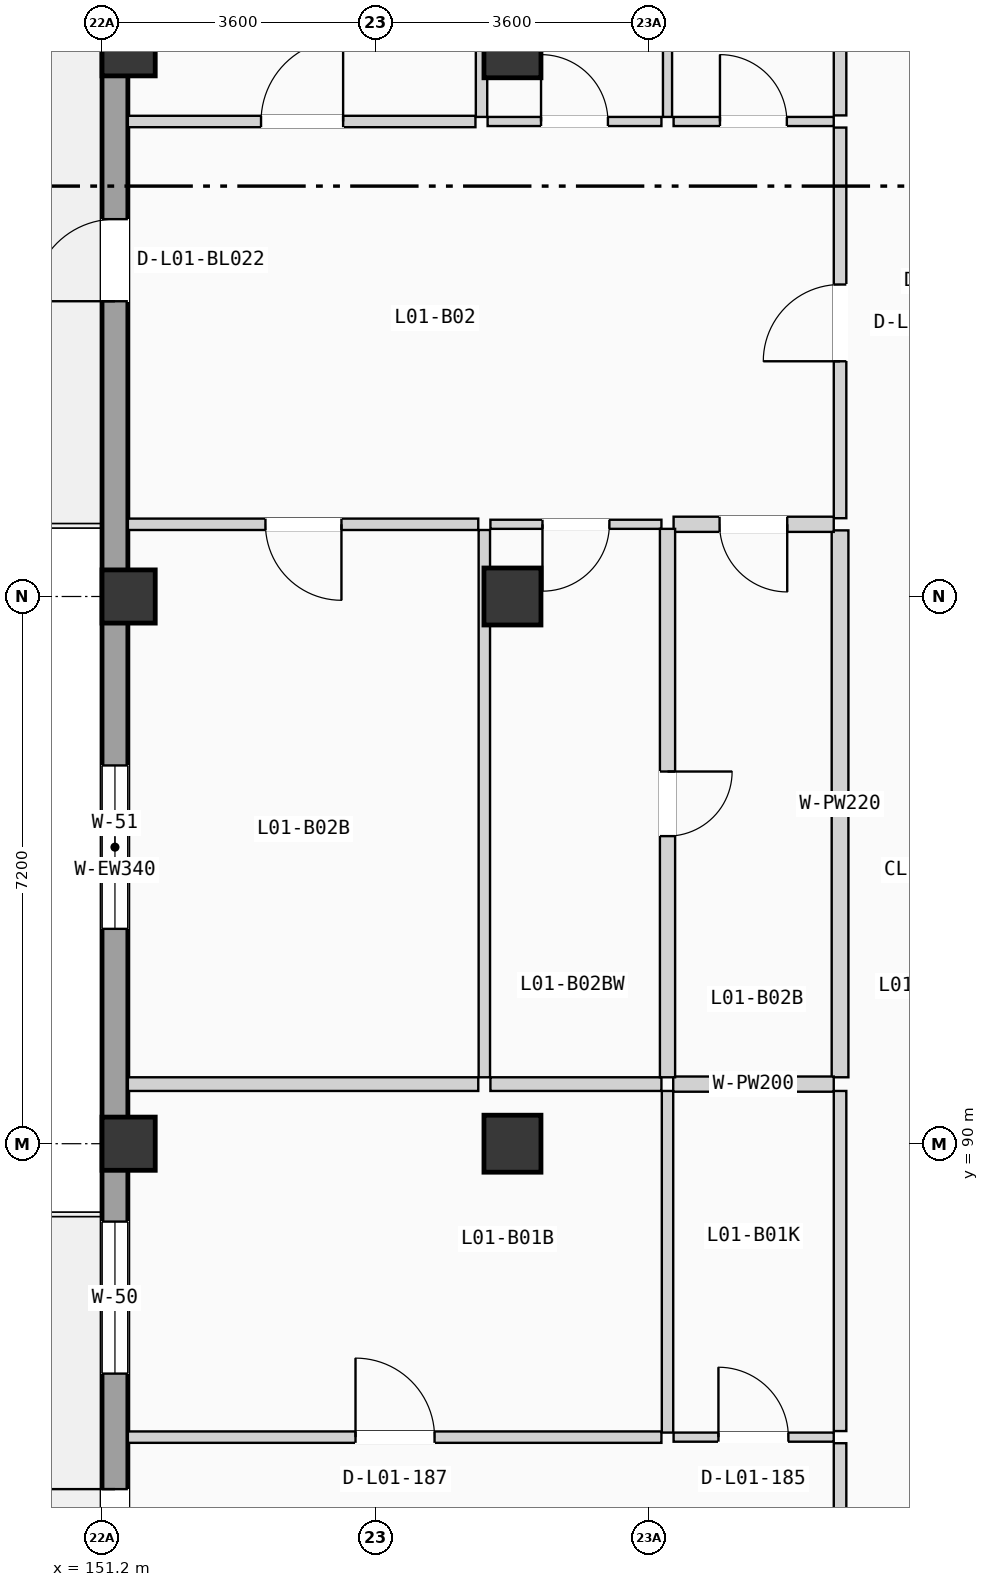
"""IFC4 building model, lengths in metres.
Left out: names, types, materials, properties, quantities, classifications, styles, units other than length and angle.
Written with IfcOpenShell. Run it as: python <this file> out.ifc"""

import sys

from ifc_helpers import new_model, si_unit, direction, frame, frame_2d, origin, origin_2d, place, context, subcontext, project, spatial, rectangle, extrude, element, fill, save


model = new_model("IFC4")
c1 = context("Model", 3, precision=1e-05, world=origin(), true_north=direction((0.0, 1.0)))
c2 = subcontext(c1, "Body", "Model", "MODEL_VIEW")
j1 = project(units=[si_unit("LENGTHUNIT", "METRE"), si_unit("PLANEANGLEUNIT", "RADIAN")], contexts=[c1])
p1 = place(None, origin())
s1 = spatial("IfcSite", under=j1, at=p1, CompositionType="ELEMENT")
p2 = place(p1, origin())
s2 = spatial("IfcBuilding", under=s1, at=p2, CompositionType="ELEMENT")
p3 = place(p2, frame((0.0, 0.0, 4.9)))
s3 = spatial("IfcBuildingStorey", under=s2, at=p3, CompositionType="ELEMENT", Elevation=4.9)
for number, where, z_axis, x_axis in (
    (1, (151.55, 90.0, 0.0), (0.0, 0.0, 1.0), (1.0, 0.0, 0.0)),
    (2, (151.55, 97.2, 0.0), (0.0, 0.0, 1.0), (1.0, 0.0, 0.0)),
    (3, (151.55, 104.4, 0.0), (0.0, 0.0, 1.0), (1.0, 0.0, 0.0)),
):
    element("IfcColumn", number, at=place(p3, frame(where, z_axis=z_axis, x_axis=x_axis)), inside=s3, PredefinedType="COLUMN", context=c2, shape_type="SweptSolid", body=[
        extrude(rectangle(XDim=0.7, YDim=0.7, at=origin_2d()), origin(), (0.0, 0.0, 1.0), 3.675),
    ])
for number, where, z_axis, x_axis in (
    (4, (156.6, 90.0, 0.0), (0.0, 0.0, 1.0), (1.0, 0.0, 0.0)),
    (5, (156.6, 97.2, 0.0), (0.0, 0.0, 1.0), (1.0, 0.0, 0.0)),
    (6, (156.6, 104.4, 0.0), (0.0, 0.0, 1.0), (1.0, 0.0, 0.0)),
):
    element("IfcColumn", number, at=place(p3, frame(where, z_axis=z_axis, x_axis=x_axis)), inside=s3, PredefinedType="COLUMN", context=c2, shape_type="SweptSolid", body=[
        extrude(rectangle(XDim=0.75, YDim=0.75, at=origin_2d()), origin(), (0.0, 0.0, 1.0), 3.675),
    ])
p4 = place(p3, frame((151.37, 68.74, 0.0), z_axis=(0.0, 0.0, 1.0), x_axis=(0.0, 1.0, 0.0)))
e7 = element("IfcWall", 7, at=p4, inside=s3, PredefinedType="SOLIDWALL", context=c2, shape_type="SweptSolid", body=[
    extrude(rectangle(XDim=49.72, YDim=0.34, at=frame_2d((24.86, 0.0))), origin(), (0.0, 0.0, 1.0), 3.415),
])
p5 = place(p4, frame((15.765, 0.0, 0.0)))
e8 = element("IfcOpeningElement", 8, at=p5, cuts=e7, PredefinedType="OPENING", context=c2, shape_type="SweptSolid", body=[
    extrude(rectangle(XDim=0.95, YDim=2.15, at=frame_2d((0.475, 1.075))), frame((0.0, 0.18, 0.0), z_axis=(0.0, -1.0, 0.0), x_axis=(1.0, 0.0, 0.0)), (0.0, 0.0, 1.0), 0.36),
])
p6 = place(p4, frame((8.498, 0.0, 0.9)))
e9 = element("IfcOpeningElement", 9, at=p6, cuts=e7, PredefinedType="OPENING", context=c2, shape_type="SweptSolid", body=[
    extrude(rectangle(XDim=2.0, YDim=1.65, at=frame_2d((1.0, 0.825))), frame((0.0, 0.18, 0.0), z_axis=(0.0, -1.0, 0.0), x_axis=(1.0, 0.0, 0.0)), (0.0, 0.0, 1.0), 0.36),
])
p7 = place(p4, frame((18.235, 0.0, 0.9)))
e10 = element("IfcOpeningElement", 10, at=p7, cuts=e7, PredefinedType="OPENING", context=c2, shape_type="SweptSolid", body=[
    extrude(rectangle(XDim=2.0, YDim=1.8, at=frame_2d((1.0, 0.9))), frame((0.0, 0.18, 0.0), z_axis=(0.0, -1.0, 0.0), x_axis=(1.0, 0.0, 0.0)), (0.0, 0.0, 1.0), 0.36),
])
p8 = place(p4, frame((32.345, 0.0, 0.0)))
e11 = element("IfcOpeningElement", 11, at=p8, cuts=e7, PredefinedType="OPENING", context=c2, shape_type="SweptSolid", body=[
    extrude(rectangle(XDim=1.08, YDim=2.18, at=frame_2d((0.54, 1.09))), frame((0.0, 0.18, 0.0), z_axis=(0.0, -1.0, 0.0), x_axis=(1.0, 0.0, 0.0)), (0.0, 0.0, 1.0), 0.36),
])
p9 = place(p4, frame((24.087, 0.0, 0.9)))
e12 = element("IfcOpeningElement", 12, at=p9, cuts=e7, PredefinedType="OPENING", context=c2, shape_type="SweptSolid", body=[
    extrude(rectangle(XDim=2.15, YDim=1.2, at=frame_2d((1.075, 0.6))), frame((0.0, 0.18, 0.0), z_axis=(0.0, -1.0, 0.0), x_axis=(1.0, 0.0, 0.0)), (0.0, 0.0, 1.0), 0.36),
])
p10 = place(p4, frame((38.12, 0.0, 0.9)))
e13 = element("IfcOpeningElement", 13, at=p10, cuts=e7, PredefinedType="OPENING", context=c2, shape_type="SweptSolid", body=[
    extrude(rectangle(XDim=2.15, YDim=1.35, at=frame_2d((1.075, 0.675))), frame((0.0, 0.18, 0.0), z_axis=(0.0, -1.0, 0.0), x_axis=(1.0, 0.0, 0.0)), (0.0, 0.0, 1.0), 0.36),
])
p11 = place(p3, frame((160.91, 80.635, 0.0), z_axis=(0.0, 0.0, 1.0), x_axis=(0.0, 1.0, 0.0)))
e14 = element("IfcWall", 14, at=p11, inside=s3, PredefinedType="PARTITIONING", context=c2, shape_type="SweptSolid", body=[
    extrude(rectangle(XDim=5.424, YDim=0.165, at=frame_2d((2.712, 0.0))), origin(), (0.0, 0.0, 1.0), 3.395),
])
p12 = place(p11, frame((2.207, 0.0, 0.0)))
e15 = element("IfcOpeningElement", 15, at=p12, cuts=e14, PredefinedType="OPENING", context=c2, shape_type="SweptSolid", body=[
    extrude(rectangle(XDim=1.01, YDim=2.11, at=frame_2d((0.505, 1.055))), frame((0.0, 0.093, 0.0), z_axis=(0.0, -1.0, 0.0), x_axis=(1.0, 0.0, 0.0)), (0.0, 0.0, 1.0), 0.185),
])
p13 = place(p3, frame((160.91, 86.219, 0.0), z_axis=(0.0, 0.0, 1.0), x_axis=(0.0, 1.0, 0.0)))
e16 = element("IfcWall", 16, at=p13, inside=s3, PredefinedType="PARTITIONING", context=c2, shape_type="SweptSolid", body=[
    extrude(rectangle(XDim=4.475, YDim=0.165, at=frame_2d((2.238, 0.0))), origin(), (0.0, 0.0, 1.0), 3.395),
])
p14 = place(p3, frame((160.91, 98.23, 0.0), z_axis=(0.0, 0.0, 1.0), x_axis=(0.0, 1.0, 0.0)))
e17 = element("IfcWall", 17, at=p14, inside=s3, PredefinedType="PARTITIONING", context=c2, shape_type="SweptSolid", body=[
    extrude(rectangle(XDim=5.14, YDim=0.165, at=frame_2d((2.57, 0.0))), origin(), (0.0, 0.0, 1.0), 3.395),
])
p15 = place(p14, frame((2.065, 0.0, 0.0)))
e18 = element("IfcOpeningElement", 18, at=p15, cuts=e17, PredefinedType="OPENING", context=c2, shape_type="SweptSolid", body=[
    extrude(rectangle(XDim=1.01, YDim=2.11, at=frame_2d((0.505, 1.055))), frame((0.0, 0.093, 0.0), z_axis=(0.0, -1.0, 0.0), x_axis=(1.0, 0.0, 0.0)), (0.0, 0.0, 1.0), 0.185),
])
p16 = place(p3, frame((160.91, 90.874, 0.0), z_axis=(0.0, 0.0, 1.0), x_axis=(0.0, 1.0, 0.0)))
e19 = element("IfcWall", 19, at=p16, inside=s3, PredefinedType="PLUMBINGWALL", context=c2, shape_type="SweptSolid", body=[
    extrude(rectangle(XDim=7.196, YDim=0.22, at=frame_2d((3.598, 0.0))), origin(), (0.0, 0.0, 1.0), 3.395),
])
p17 = place(p3, frame((160.91, 103.53, 0.0), z_axis=(0.0, 0.0, 1.0), x_axis=(0.0, 1.0, 0.0)))
e20 = element("IfcWall", 20, at=p17, inside=s3, PredefinedType="PARTITIONING", context=c2, shape_type="SweptSolid", body=[
    extrude(rectangle(XDim=7.67, YDim=0.165, at=frame_2d((3.835, 0.0))), origin(), (0.0, 0.0, 1.0), 3.395),
])
p18 = place(p3, frame((158.72, 86.139, 0.0), z_axis=(0.0, 0.0, 1.0), x_axis=(1.0, 0.0, 0.0)))
e21 = element("IfcWall", 21, at=p18, inside=s3, PredefinedType="PARTITIONING", context=c2, shape_type="SweptSolid", body=[
    extrude(rectangle(XDim=2.107, YDim=0.12, at=frame_2d((1.053, 0.0))), origin(), (0.0, 0.0, 1.0), 3.395),
])
p19 = place(p18, frame((0.59, 0.0, 0.0)))
e22 = element("IfcOpeningElement", 22, at=p19, cuts=e21, PredefinedType="OPENING", context=c2, shape_type="SweptSolid", body=[
    extrude(rectangle(XDim=0.92, YDim=2.02, at=frame_2d((0.46, 1.01))), frame((0.0, 0.07, 0.0), z_axis=(0.0, -1.0, 0.0), x_axis=(1.0, 0.0, 0.0)), (0.0, 0.0, 1.0), 0.14),
])
p20 = place(p3, frame((151.54, 86.139, 0.0), z_axis=(0.0, 0.0, 1.0), x_axis=(1.0, 0.0, 0.0)))
e23 = element("IfcWall", 23, at=p20, inside=s3, PredefinedType="PARTITIONING", context=c2, shape_type="SweptSolid", body=[
    extrude(rectangle(XDim=7.02, YDim=0.15, at=frame_2d((3.51, 0.0))), origin(), (0.0, 0.0, 1.0), 3.395),
])
p21 = place(p20, frame((2.995, 0.0, 0.0)))
e24 = element("IfcOpeningElement", 24, at=p21, cuts=e23, PredefinedType="OPENING", context=c2, shape_type="SweptSolid", body=[
    extrude(rectangle(XDim=1.04, YDim=2.08, at=frame_2d((0.52, 1.04))), frame((0.0, 0.085, 0.0), z_axis=(0.0, -1.0, 0.0), x_axis=(1.0, 0.0, 0.0)), (0.0, 0.0, 1.0), 0.17),
])
p22 = place(p3, frame((158.64, 86.199, 0.0), z_axis=(0.0, 0.0, 1.0), x_axis=(0.0, 1.0, 0.0)))
e25 = element("IfcWall", 25, at=p22, inside=s3, PredefinedType="PARTITIONING", context=c2, shape_type="SweptSolid", body=[
    extrude(rectangle(XDim=4.495, YDim=0.15, at=frame_2d((2.248, 0.0))), origin(), (0.0, 0.0, 1.0), 3.395),
])
p23 = place(p3, frame((158.715, 90.784, 0.0), z_axis=(0.0, 0.0, 1.0), x_axis=(1.0, 0.0, 0.0)))
e26 = element("IfcWall", 26, at=p23, inside=s3, PredefinedType="PLUMBINGWALL", context=c2, shape_type="SweptSolid", body=[
    extrude(rectangle(XDim=2.112, YDim=0.2, at=frame_2d((1.056, 0.0))), origin(), (0.0, 0.0, 1.0), 3.395),
])
p24 = place(p3, frame((151.54, 90.784, 0.0), z_axis=(0.0, 0.0, 1.0), x_axis=(1.0, 0.0, 0.0)))
e27 = element("IfcWall", 27, at=p24, inside=s3, PredefinedType="PARTITIONING", context=c2, shape_type="SweptSolid", body=[
    extrude(rectangle(XDim=4.61, YDim=0.18, at=frame_2d((2.305, 0.0))), origin(), (0.0, 0.0, 1.0), 3.395),
])
p25 = place(p3, frame((156.31, 90.784, 0.0), z_axis=(0.0, 0.0, 1.0), x_axis=(1.0, 0.0, 0.0)))
e28 = element("IfcWall", 28, at=p25, inside=s3, PredefinedType="PARTITIONING", context=c2, shape_type="SweptSolid", body=[
    extrude(rectangle(XDim=2.25, YDim=0.18, at=frame_2d((1.125, 0.0))), origin(), (0.0, 0.0, 1.0), 3.395),
])
p26 = place(p3, frame((158.72, 98.15, 0.0), z_axis=(0.0, 0.0, 1.0), x_axis=(1.0, 0.0, 0.0)))
e29 = element("IfcWall", 29, at=p26, inside=s3, PredefinedType="PLUMBINGWALL", context=c2, shape_type="SweptSolid", body=[
    extrude(rectangle(XDim=2.107, YDim=0.2, at=frame_2d((1.053, 0.0))), origin(), (0.0, 0.0, 1.0), 3.395),
])
p27 = place(p26, frame((0.605, 0.0, 0.0)))
e30 = element("IfcOpeningElement", 30, at=p27, cuts=e29, PredefinedType="OPENING", context=c2, shape_type="SweptSolid", body=[
    extrude(rectangle(XDim=0.89, YDim=2.03, at=frame_2d((0.445, 1.015))), frame((0.0, 0.11, 0.0), z_axis=(0.0, -1.0, 0.0), x_axis=(1.0, 0.0, 0.0)), (0.0, 0.0, 1.0), 0.22),
])
p28 = place(p3, frame((158.72, 103.45, 0.0), z_axis=(0.0, 0.0, 1.0), x_axis=(1.0, 0.0, 0.0)))
e31 = element("IfcWall", 31, at=p28, inside=s3, PredefinedType="PARTITIONING", context=c2, shape_type="SweptSolid", body=[
    extrude(rectangle(XDim=2.107, YDim=0.12, at=frame_2d((1.053, 0.0))), origin(), (0.0, 0.0, 1.0), 3.395),
])
p29 = place(p28, frame((0.61, 0.0, 0.0)))
e32 = element("IfcOpeningElement", 32, at=p29, cuts=e31, PredefinedType="OPENING", context=c2, shape_type="SweptSolid", body=[
    extrude(rectangle(XDim=0.88, YDim=2.02, at=frame_2d((0.44, 1.01))), frame((0.0, 0.07, 0.0), z_axis=(0.0, -1.0, 0.0), x_axis=(1.0, 0.0, 0.0)), (0.0, 0.0, 1.0), 0.14),
])
p30 = place(p3, frame((151.54, 98.15, 0.0), z_axis=(0.0, 0.0, 1.0), x_axis=(1.0, 0.0, 0.0)))
e33 = element("IfcWall", 33, at=p30, inside=s3, PredefinedType="PARTITIONING", context=c2, shape_type="SweptSolid", body=[
    extrude(rectangle(XDim=4.61, YDim=0.15, at=frame_2d((2.305, 0.0))), origin(), (0.0, 0.0, 1.0), 3.395),
])
p31 = place(p30, frame((1.81, 0.0, 0.0)))
e34 = element("IfcOpeningElement", 34, at=p31, cuts=e33, PredefinedType="OPENING", context=c2, shape_type="SweptSolid", body=[
    extrude(rectangle(XDim=1.0, YDim=2.06, at=frame_2d((0.5, 1.03))), frame((0.0, 0.085, 0.0), z_axis=(0.0, -1.0, 0.0), x_axis=(1.0, 0.0, 0.0)), (0.0, 0.0, 1.0), 0.17),
])
p32 = place(p3, frame((156.31, 98.15, 0.0), z_axis=(0.0, 0.0, 1.0), x_axis=(1.0, 0.0, 0.0)))
e35 = element("IfcWall", 35, at=p32, inside=s3, PredefinedType="PARTITIONING", context=c2, shape_type="SweptSolid", body=[
    extrude(rectangle(XDim=2.25, YDim=0.12, at=frame_2d((1.125, 0.0))), origin(), (0.0, 0.0, 1.0), 3.395),
])
p33 = place(p32, frame((0.685, 0.0, 0.0)))
e36 = element("IfcOpeningElement", 36, at=p33, cuts=e35, PredefinedType="OPENING", context=c2, shape_type="SweptSolid", body=[
    extrude(rectangle(XDim=0.88, YDim=2.02, at=frame_2d((0.44, 1.01))), frame((0.0, 0.07, 0.0), z_axis=(0.0, -1.0, 0.0), x_axis=(1.0, 0.0, 0.0)), (0.0, 0.0, 1.0), 0.14),
])
p34 = place(p3, frame((151.54, 103.45, 0.0), z_axis=(0.0, 0.0, 1.0), x_axis=(1.0, 0.0, 0.0)))
e37 = element("IfcWall", 37, at=p34, inside=s3, PredefinedType="PARTITIONING", context=c2, shape_type="SweptSolid", body=[
    extrude(rectangle(XDim=4.573, YDim=0.15, at=frame_2d((2.287, 0.0))), origin(), (0.0, 0.0, 1.0), 3.395),
])
p35 = place(p34, frame((1.752, 0.0, 0.0)))
e38 = element("IfcOpeningElement", 38, at=p35, cuts=e37, PredefinedType="OPENING", context=c2, shape_type="SweptSolid", body=[
    extrude(rectangle(XDim=1.08, YDim=2.1, at=frame_2d((0.54, 1.05))), frame((0.0, 0.085, 0.0), z_axis=(0.0, -1.0, 0.0), x_axis=(1.0, 0.0, 0.0)), (0.0, 0.0, 1.0), 0.17),
])
p36 = place(p3, frame((156.273, 103.45, 0.0), z_axis=(0.0, 0.0, 1.0), x_axis=(1.0, 0.0, 0.0)))
e39 = element("IfcWall", 39, at=p36, inside=s3, PredefinedType="PARTITIONING", context=c2, shape_type="SweptSolid", body=[
    extrude(rectangle(XDim=2.287, YDim=0.12, at=frame_2d((1.144, 0.0))), origin(), (0.0, 0.0, 1.0), 3.395),
])
p37 = place(p36, frame((0.703, 0.0, 0.0)))
e40 = element("IfcOpeningElement", 40, at=p37, cuts=e39, PredefinedType="OPENING", context=c2, shape_type="SweptSolid", body=[
    extrude(rectangle(XDim=0.88, YDim=2.02, at=frame_2d((0.44, 1.01))), frame((0.0, 0.07, 0.0), z_axis=(0.0, -1.0, 0.0), x_axis=(1.0, 0.0, 0.0)), (0.0, 0.0, 1.0), 0.14),
])
p38 = place(p3, frame((158.64, 90.874, 0.0), z_axis=(0.0, 0.0, 1.0), x_axis=(0.0, 1.0, 0.0)))
e41 = element("IfcWall", 41, at=p38, inside=s3, PredefinedType="PLUMBINGWALL", context=c2, shape_type="SweptSolid", body=[
    extrude(rectangle(XDim=7.216, YDim=0.2, at=frame_2d((3.608, 0.0))), origin(), (0.0, 0.0, 1.0), 3.395),
])
p39 = place(p38, frame((3.173, 0.0, 0.0)))
e42 = element("IfcOpeningElement", 42, at=p39, cuts=e41, PredefinedType="OPENING", context=c2, shape_type="SweptSolid", body=[
    extrude(rectangle(XDim=0.85, YDim=2.01, at=frame_2d((0.425, 1.005))), frame((0.0, 0.11, 0.0), z_axis=(0.0, -1.0, 0.0), x_axis=(1.0, 0.0, 0.0)), (0.0, 0.0, 1.0), 0.22),
])
p40 = place(p3, frame((158.64, 103.51, 0.0), z_axis=(0.0, 0.0, 1.0), x_axis=(0.0, 1.0, 0.0)))
e43 = element("IfcWall", 43, at=p40, inside=s3, PredefinedType="PARTITIONING", context=c2, shape_type="SweptSolid", body=[
    extrude(rectangle(XDim=7.69, YDim=0.12, at=frame_2d((3.845, 0.0))), origin(), (0.0, 0.0, 1.0), 3.395),
])
p41 = place(p3, frame((156.23, 90.874, 0.0), z_axis=(0.0, 0.0, 1.0), x_axis=(0.0, 1.0, 0.0)))
e44 = element("IfcWall", 44, at=p41, inside=s3, PredefinedType="PARTITIONING", context=c2, shape_type="SweptSolid", body=[
    extrude(rectangle(XDim=7.201, YDim=0.15, at=frame_2d((3.601, 0.0))), origin(), (0.0, 0.0, 1.0), 3.395),
])
p42 = place(p3, frame((156.193, 103.51, 0.0), z_axis=(0.0, 0.0, 1.0), x_axis=(0.0, 1.0, 0.0)))
e45 = element("IfcWall", 45, at=p42, inside=s3, PredefinedType="PARTITIONING", context=c2, shape_type="SweptSolid", body=[
    extrude(rectangle(XDim=7.69, YDim=0.15, at=frame_2d((3.845, 0.0))), origin(), (0.0, 0.0, 1.0), 3.395),
])
p43 = place(p5, origin())
e46 = element("IfcDoor", 46, at=p43, inside=s3, OperationType="SINGLE_SWING_RIGHT", PredefinedType="DOOR", context=c2, shape_type="SweptSolid", body=[
    extrude(rectangle(XDim=0.95, YDim=2.15, at=frame_2d((0.475, 1.075))), frame((0.0, 0.025, 0.0), z_axis=(0.0, -1.0, 0.0), x_axis=(1.0, 0.0, 0.0)), (0.0, 0.0, 1.0), 0.05),
])
fill(e8, e46)
p44 = place(p7, origin())
e47 = element("IfcWindow", 47, at=p44, inside=s3, PartitioningType="DOUBLE_PANEL_VERTICAL", PredefinedType="WINDOW", context=c2, shape_type="SweptSolid", body=[
    extrude(rectangle(XDim=2.0, YDim=1.8, at=frame_2d((1.0, 0.9))), frame((0.0, 0.03, 0.0), z_axis=(0.0, -1.0, 0.0), x_axis=(1.0, 0.0, 0.0)), (0.0, 0.0, 1.0), 0.06),
])
fill(e10, e47)
p45 = place(p8, origin())
e48 = element("IfcDoor", 48, at=p45, inside=s3, OperationType="SINGLE_SWING_LEFT", PredefinedType="DOOR", context=c2, shape_type="SweptSolid", body=[
    extrude(rectangle(XDim=1.08, YDim=2.18, at=frame_2d((0.54, 1.09))), frame((0.0, 0.025, 0.0), z_axis=(0.0, -1.0, 0.0), x_axis=(1.0, 0.0, 0.0)), (0.0, 0.0, 1.0), 0.05),
])
fill(e11, e48)
p46 = place(p9, origin())
e49 = element("IfcWindow", 49, at=p46, inside=s3, PartitioningType="DOUBLE_PANEL_VERTICAL", PredefinedType="WINDOW", context=c2, shape_type="SweptSolid", body=[
    extrude(rectangle(XDim=2.15, YDim=1.2, at=frame_2d((1.075, 0.6))), frame((0.0, 0.03, 0.0), z_axis=(0.0, -1.0, 0.0), x_axis=(1.0, 0.0, 0.0)), (0.0, 0.0, 1.0), 0.06),
])
fill(e12, e49)
p47 = place(p15, origin())
e50 = element("IfcDoor", 50, at=p47, inside=s3, OperationType="SINGLE_SWING_LEFT", PredefinedType="DOOR", context=c2, shape_type="SweptSolid", body=[
    extrude(rectangle(XDim=1.01, YDim=2.11, at=frame_2d((0.505, 1.055))), frame((0.0, 0.025, 0.0), z_axis=(0.0, -1.0, 0.0), x_axis=(1.0, 0.0, 0.0)), (0.0, 0.0, 1.0), 0.05),
])
fill(e18, e50)
p48 = place(p19, origin())
e51 = element("IfcDoor", 51, at=p48, inside=s3, OperationType="SINGLE_SWING_LEFT", PredefinedType="DOOR", context=c2, shape_type="SweptSolid", body=[
    extrude(rectangle(XDim=0.92, YDim=2.02, at=frame_2d((0.46, 1.01))), frame((0.0, 0.025, 0.0), z_axis=(0.0, -1.0, 0.0), x_axis=(1.0, 0.0, 0.0)), (0.0, 0.0, 1.0), 0.05),
])
fill(e22, e51)
p49 = place(p21, origin())
e52 = element("IfcDoor", 52, at=p49, inside=s3, OperationType="SINGLE_SWING_LEFT", PredefinedType="DOOR", context=c2, shape_type="SweptSolid", body=[
    extrude(rectangle(XDim=1.04, YDim=2.08, at=frame_2d((0.52, 1.04))), frame((0.0, 0.025, 0.0), z_axis=(0.0, -1.0, 0.0), x_axis=(1.0, 0.0, 0.0)), (0.0, 0.0, 1.0), 0.05),
])
fill(e24, e52)
p50 = place(p27, frame((0.89, 0.0, 0.0), z_axis=(0.0, 0.0, 1.0), x_axis=(-1.0, 0.0, 0.0)))
e53 = element("IfcDoor", 53, at=p50, inside=s3, OperationType="SINGLE_SWING_RIGHT", PredefinedType="DOOR", context=c2, shape_type="SweptSolid", body=[
    extrude(rectangle(XDim=0.89, YDim=2.03, at=frame_2d((0.445, 1.015))), frame((0.0, 0.025, 0.0), z_axis=(0.0, -1.0, 0.0), x_axis=(1.0, 0.0, 0.0)), (0.0, 0.0, 1.0), 0.05),
])
fill(e30, e53)
p51 = place(p29, origin())
e54 = element("IfcDoor", 54, at=p51, inside=s3, OperationType="SINGLE_SWING_LEFT", PredefinedType="DOOR", context=c2, shape_type="SweptSolid", body=[
    extrude(rectangle(XDim=0.88, YDim=2.02, at=frame_2d((0.44, 1.01))), frame((0.0, 0.025, 0.0), z_axis=(0.0, -1.0, 0.0), x_axis=(1.0, 0.0, 0.0)), (0.0, 0.0, 1.0), 0.05),
])
fill(e32, e54)
p52 = place(p31, frame((1.0, 0.0, 0.0), z_axis=(0.0, 0.0, 1.0), x_axis=(-1.0, 0.0, 0.0)))
e55 = element("IfcDoor", 55, at=p52, inside=s3, OperationType="SINGLE_SWING_RIGHT", PredefinedType="DOOR", context=c2, shape_type="SweptSolid", body=[
    extrude(rectangle(XDim=1.0, YDim=2.06, at=frame_2d((0.5, 1.03))), frame((0.0, 0.025, 0.0), z_axis=(0.0, -1.0, 0.0), x_axis=(1.0, 0.0, 0.0)), (0.0, 0.0, 1.0), 0.05),
])
fill(e34, e55)
p53 = place(p33, frame((0.88, 0.0, 0.0), z_axis=(0.0, 0.0, 1.0), x_axis=(-1.0, 0.0, 0.0)))
e56 = element("IfcDoor", 56, at=p53, inside=s3, OperationType="SINGLE_SWING_LEFT", PredefinedType="DOOR", context=c2, shape_type="SweptSolid", body=[
    extrude(rectangle(XDim=0.88, YDim=2.02, at=frame_2d((0.44, 1.01))), frame((0.0, 0.025, 0.0), z_axis=(0.0, -1.0, 0.0), x_axis=(1.0, 0.0, 0.0)), (0.0, 0.0, 1.0), 0.05),
])
fill(e36, e56)
p54 = place(p35, origin())
e57 = element("IfcDoor", 57, at=p54, inside=s3, OperationType="SINGLE_SWING_RIGHT", PredefinedType="DOOR", context=c2, shape_type="SweptSolid", body=[
    extrude(rectangle(XDim=1.08, YDim=2.1, at=frame_2d((0.54, 1.05))), frame((0.0, 0.025, 0.0), z_axis=(0.0, -1.0, 0.0), x_axis=(1.0, 0.0, 0.0)), (0.0, 0.0, 1.0), 0.05),
])
fill(e38, e57)
p55 = place(p37, origin())
e58 = element("IfcDoor", 58, at=p55, inside=s3, OperationType="SINGLE_SWING_LEFT", PredefinedType="DOOR", context=c2, shape_type="SweptSolid", body=[
    extrude(rectangle(XDim=0.88, YDim=2.02, at=frame_2d((0.44, 1.01))), frame((0.0, 0.025, 0.0), z_axis=(0.0, -1.0, 0.0), x_axis=(1.0, 0.0, 0.0)), (0.0, 0.0, 1.0), 0.05),
])
fill(e40, e58)
p56 = place(p39, frame((0.85, 0.0, 0.0), z_axis=(0.0, 0.0, 1.0), x_axis=(-1.0, 0.0, 0.0)))
e59 = element("IfcDoor", 59, at=p56, inside=s3, OperationType="SINGLE_SWING_RIGHT", PredefinedType="DOOR", context=c2, shape_type="SweptSolid", body=[
    extrude(rectangle(XDim=0.85, YDim=2.01, at=frame_2d((0.425, 1.005))), frame((0.0, 0.025, 0.0), z_axis=(0.0, -1.0, 0.0), x_axis=(1.0, 0.0, 0.0)), (0.0, 0.0, 1.0), 0.05),
])
fill(e42, e59)
save(model, sys.argv[1])
